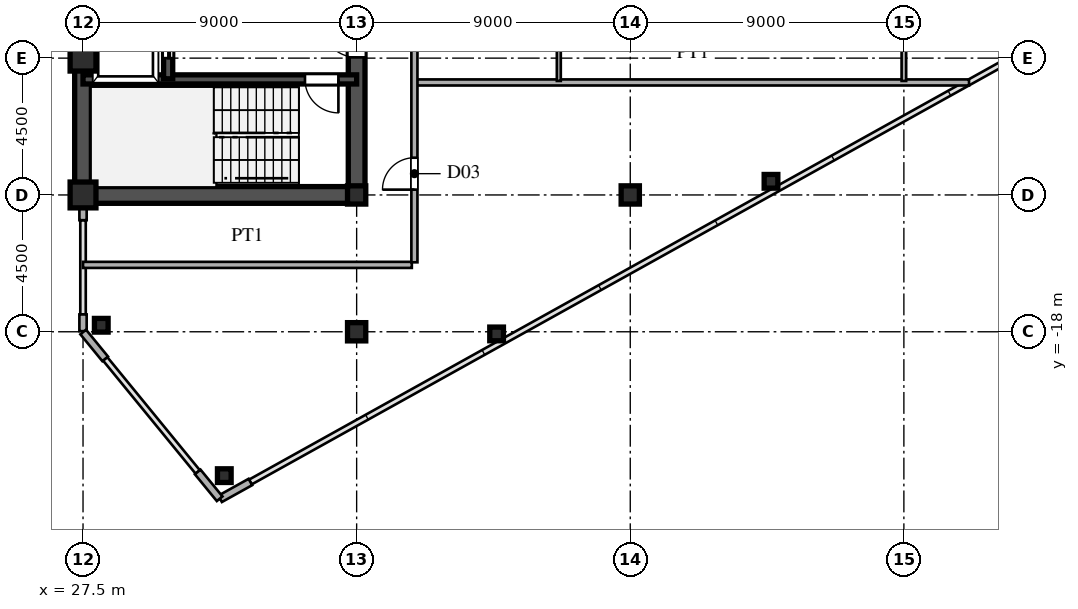
"""IFC4 building model, lengths in metres.
Left out: names, types, materials, properties, quantities, classifications, styles, units other than length and angle.
Written with IfcOpenShell. Run it as: python <this file> out.ifc"""

import sys

from ifc_helpers import new_model, si_unit, direction, frame, frame_2d, origin, origin_2d, place, context, subcontext, project, spatial, rectangle, hollow_rectangle, i_section, extrude, source, transform, mapped, element, fill, save


model = new_model("IFC4")
c1 = context("Model", 3, precision=1e-05, world=origin(), true_north=direction((0.0, 1.0)))
c2 = subcontext(c1, "Body", "Model", "MODEL_VIEW")
j1 = project(units=[si_unit("LENGTHUNIT", "METRE"), si_unit("PLANEANGLEUNIT", "RADIAN")], contexts=[c1])
p1 = place(None, origin())
s1 = spatial("IfcSite", under=j1, at=p1, CompositionType="ELEMENT")
p2 = place(p1, origin())
s2 = spatial("IfcBuilding", under=s1, at=p2, CompositionType="ELEMENT")
p3 = place(p2, frame((0.0, 0.0, 188.7)))
s3 = spatial("IfcBuildingStorey", under=s2, at=p3, CompositionType="ELEMENT", Elevation=188.7)
m1 = source(origin(), c2, "Body", "SweptSolid", [
    extrude(hollow_rectangle(XDim=0.85, YDim=0.85, WallThickness=0.036, at=origin_2d()), origin(), (0.0, 0.0, 1.0), 3.6),
])
for number, where, z_axis, x_axis in (
    (1, (27.5, -13.5, 0.0), (0.0, 0.0, 1.0), (1.0, 0.0, 0.0)),
    (2, (27.5, -9.0, 0.0), (0.0, 0.0, 1.0), (1.0, 0.0, 0.0)),
):
    element("IfcColumn", number, at=place(p3, frame(where, z_axis=z_axis, x_axis=x_axis)), inside=s3, PredefinedType="COLUMN", context=c2, shape_type="MappedRepresentation", body=[
        mapped(m1, transform((0.0, 0.0, 0.0), scale=1.0)),
    ])
m2 = source(origin(), c2, "Body", "SweptSolid", [
    extrude(i_section(OverallWidth=0.6, OverallDepth=0.6, WebThickness=0.025, FlangeThickness=0.04, at=origin_2d()), origin(), (0.0, 0.0, 1.0), 3.6),
])
for number, where, z_axis, x_axis in (
    (3, (36.5, -18.0, 0.0), (0.0, 0.0, 1.0), (1.0, 0.0, 0.0)),
    (4, (36.5, -13.5, 0.0), (0.0, 0.0, 1.0), (1.0, 0.0, 0.0)),
    (5, (45.5, -13.5, 0.0), (0.0, 0.0, 1.0), (1.0, 0.0, 0.0)),
):
    element("IfcColumn", number, at=place(p3, frame(where, z_axis=z_axis, x_axis=x_axis)), inside=s3, PredefinedType="COLUMN", context=c2, shape_type="MappedRepresentation", body=[
        mapped(m2, transform((0.0, 0.0, 0.0), scale=1.0)),
    ])
m3 = source(origin(), c2, "Body", "SweptSolid", [
    extrude(hollow_rectangle(XDim=0.45, YDim=0.45, WallThickness=0.018, at=origin_2d()), origin(), (0.0, 0.0, 1.0), 3.6),
])
for number, where, z_axis, x_axis in (
    (6, (32.147, -22.732, 0.0), (0.0, 0.0, 1.0), (1.0, 0.0, 0.0)),
    (7, (28.1, -17.786, 0.0), (0.0, 0.0, 1.0), (1.0, 0.0, 0.0)),
    (8, (41.104, -18.071, 0.0), (0.0, 0.0, 1.0), (1.0, 0.0, 0.0)),
    (9, (50.129, -13.051, 0.0), (0.0, 0.0, 1.0), (1.0, 0.0, 0.0)),
):
    element("IfcColumn", number, at=place(p3, frame(where, z_axis=z_axis, x_axis=x_axis)), inside=s3, PredefinedType="COLUMN", context=c2, shape_type="MappedRepresentation", body=[
        mapped(m3, transform((0.0, 0.0, 0.0), scale=1.0)),
    ])
p4 = place(p3, frame((32.009, -23.495, 0.0), z_axis=(0.0, 0.0, 1.0), x_axis=(0.87385402111, 0.486188389196, 0.0)))
e10 = element("IfcWall", 10, at=p4, inside=s3, PredefinedType="SOLIDWALL", context=c2, shape_type="SweptSolid", body=[
    extrude(rectangle(XDim=1.14, YDim=0.24, at=frame_2d((0.57, 0.0))), origin(), (0.0, 0.0, 1.0), 3.38),
])
p5 = place(p3, frame((27.5, -17.98, 0.0), z_axis=(0.0, 0.0, 1.0), x_axis=(0.0, 1.0, 0.0)))
e11 = element("IfcWall", 11, at=p5, inside=s3, PredefinedType="SOLIDWALL", context=c2, shape_type="SweptSolid", body=[
    extrude(rectangle(XDim=0.55, YDim=0.24, at=frame_2d((0.275, 0.0))), origin(), (0.0, 0.0, 1.0), 3.38),
])
p6 = place(p3, frame((27.5, -14.33, 0.0), z_axis=(0.0, 0.0, 1.0), x_axis=(0.0, 1.0, 0.0)))
e12 = element("IfcWall", 12, at=p6, inside=s3, PredefinedType="SOLIDWALL", context=c2, shape_type="SweptSolid", body=[
    extrude(rectangle(XDim=0.55, YDim=0.24, at=frame_2d((0.275, 0.0))), origin(), (0.0, 0.0, 1.0), 2.88),
])
for number, where, z_axis, x_axis in (
    (13, (27.506, -18.008, 0.0), (0.0, 0.0, 1.0), (0.633, -0.774, 0.0)),
    (14, (31.272, -22.61, 0.0), (0.0, 0.0, 1.0), (0.633, -0.774, 0.0)),
):
    element("IfcWall", number, at=place(p3, frame(where, z_axis=z_axis, x_axis=x_axis)), inside=s3, PredefinedType="SOLIDWALL", context=c2, shape_type="SweptSolid", body=[
        extrude(rectangle(XDim=1.14, YDim=0.24, at=frame_2d((0.57, 0.0))), origin(), (0.0, 0.0, 1.0), 3.38),
    ])
p7 = place(p3, frame((27.5, -13.5, 0.0), z_axis=(0.0, 0.0, 1.0), x_axis=(0.0, 1.0, 0.0)))
e15 = element("IfcWall", 15, at=p7, inside=s3, PredefinedType="SHEAR", context=c2, shape_type="SweptSolid", body=[
    extrude(rectangle(XDim=12.2, YDim=0.55, at=frame_2d((6.1, 0.0))), origin(), (0.0, 0.0, 1.0), 3.38),
])
p8 = place(p3, frame((27.5, -13.5, 0.0), z_axis=(0.0, 0.0, 1.0), x_axis=(1.0, 0.0, 0.0)))
e16 = element("IfcWall", 16, at=p8, inside=s3, PredefinedType="SHEAR", context=c2, shape_type="SweptSolid", body=[
    extrude(rectangle(XDim=9.0, YDim=0.55, at=frame_2d((4.5, 0.0))), origin(), (0.0, 0.0, 1.0), 3.38),
])
p9 = place(p3, frame((36.5, -13.65, 0.0), z_axis=(0.0, 0.0, 1.0), x_axis=(0.0, 1.0, 0.0)))
e17 = element("IfcWall", 17, at=p9, inside=s3, PredefinedType="SHEAR", context=c2, shape_type="SweptSolid", body=[
    extrude(rectangle(XDim=7.15, YDim=0.55, at=frame_2d((3.575, 0.0))), origin(), (0.0, 0.0, 1.0), 3.38),
])
p10 = place(p9, frame((4.675, 0.0, 0.0)))
e18 = element("IfcOpeningElement", 18, at=p10, cuts=e17, PredefinedType="OPENING", context=c2, shape_type="SweptSolid", body=[
    extrude(rectangle(XDim=1.15, YDim=2.2, at=frame_2d((0.575, 1.1))), frame((0.0, 0.285, 0.0), z_axis=(0.0, -1.0, 0.0), x_axis=(1.0, 0.0, 0.0)), (0.0, 0.0, 1.0), 0.57),
])
p11 = place(p3, frame((27.5, -9.7, 0.0), z_axis=(0.0, 0.0, 1.0), x_axis=(1.0, 0.0, 0.0)))
e19 = element("IfcWall", 19, at=p11, inside=s3, PredefinedType="SHEAR", context=c2, shape_type="SweptSolid", body=[
    extrude(rectangle(XDim=9.0, YDim=0.3, at=frame_2d((4.5, 0.0))), origin(), (0.0, 0.0, 1.0), 3.38),
])
p12 = place(p11, frame((7.3, 0.0, 0.0)))
e20 = element("IfcOpeningElement", 20, at=p12, cuts=e19, PredefinedType="OPENING", context=c2, shape_type="SweptSolid", body=[
    extrude(rectangle(XDim=1.1, YDim=2.2, at=frame_2d((0.55, 1.1))), frame((0.0, 0.16, 0.0), z_axis=(0.0, -1.0, 0.0), x_axis=(1.0, 0.0, 0.0)), (0.0, 0.0, 1.0), 0.32),
])
p13 = place(p3, frame((30.3, -9.68, 0.0), z_axis=(0.0, 0.0, 1.0), x_axis=(0.0, 1.0, 0.0)))
e21 = element("IfcWall", 21, at=p13, inside=s3, PredefinedType="SHEAR", context=c2, shape_type="SweptSolid", body=[
    extrude(rectangle(XDim=2.56, YDim=0.3, at=frame_2d((1.28, 0.0))), origin(), (0.0, 0.0, 1.0), 3.38),
])
p14 = place(p13, frame((0.68, 0.0, 0.0)))
e22 = element("IfcOpeningElement", 22, at=p14, cuts=e21, PredefinedType="OPENING", context=c2, shape_type="SweptSolid", body=[
    extrude(rectangle(XDim=1.2, YDim=2.25, at=frame_2d((0.6, 1.125))), frame((0.0, 0.16, 0.0), z_axis=(0.0, -1.0, 0.0), x_axis=(1.0, 0.0, 0.0)), (0.0, 0.0, 1.0), 0.32),
])
p15 = place(p3, frame((27.5, -15.8, 0.0), z_axis=(0.0, 0.0, 1.0), x_axis=(1.0, 0.0, 0.0)))
e23 = element("IfcWall", 23, at=p15, inside=s3, PredefinedType="PARTITIONING", context=c2, shape_type="SweptSolid", body=[
    extrude(rectangle(XDim=10.815, YDim=0.2, at=frame_2d((5.407, 0.0))), origin(), (0.0, 0.0, 1.0), 3.38),
])
p16 = place(p3, frame((38.48, -9.8, 0.0), z_axis=(0.0, 0.0, 1.0), x_axis=(1.0, 0.0, 0.0)))
e24 = element("IfcWall", 24, at=p16, inside=s3, PredefinedType="PARTITIONING", context=c2, shape_type="SweptSolid", body=[
    extrude(rectangle(XDim=18.163, YDim=0.2, at=frame_2d((9.082, 0.0))), origin(), (0.0, 0.0, 1.0), 3.38),
])
p17 = place(p3, frame((38.4, -15.715, 0.0), z_axis=(0.0, 0.0, 1.0), x_axis=(0.0, 1.0, 0.0)))
e25 = element("IfcWall", 25, at=p17, inside=s3, PredefinedType="PARTITIONING", context=c2, shape_type="SweptSolid", body=[
    extrude(rectangle(XDim=31.43, YDim=0.2, at=frame_2d((15.715, 0.0))), origin(), (0.0, 0.0, 1.0), 3.38),
])
p18 = place(p17, frame((2.39, 0.0, 0.0)))
e26 = element("IfcOpeningElement", 26, at=p18, cuts=e25, PredefinedType="OPENING", context=c2, shape_type="SweptSolid", body=[
    extrude(rectangle(XDim=1.05, YDim=2.25, at=frame_2d((0.525, 1.125))), frame((0.0, 0.11, 0.0), z_axis=(0.0, -1.0, 0.0), x_axis=(1.0, 0.0, 0.0)), (0.0, 0.0, 1.0), 0.22),
])
p19 = place(p17, frame((11.695, 0.0, 0.0)))
e27 = element("IfcOpeningElement", 27, at=p19, cuts=e25, PredefinedType="OPENING", context=c2, shape_type="SweptSolid", body=[
    extrude(rectangle(XDim=1.05, YDim=2.25, at=frame_2d((0.525, 1.125))), frame((0.0, 0.11, 0.0), z_axis=(0.0, -1.0, 0.0), x_axis=(1.0, 0.0, 0.0)), (0.0, 0.0, 1.0), 0.22),
])
p20 = place(p17, frame((24.69, 0.0, 0.0)))
e28 = element("IfcOpeningElement", 28, at=p20, cuts=e25, PredefinedType="OPENING", context=c2, shape_type="SweptSolid", body=[
    extrude(rectangle(XDim=1.05, YDim=2.25, at=frame_2d((0.525, 1.125))), frame((0.0, 0.11, 0.0), z_axis=(0.0, -1.0, 0.0), x_axis=(1.0, 0.0, 0.0)), (0.0, 0.0, 1.0), 0.22),
])
p21 = place(p3, frame((43.15, -9.75, 0.0), z_axis=(0.0, 0.0, 1.0), x_axis=(0.0, 1.0, 0.0)))
e29 = element("IfcWall", 29, at=p21, inside=s3, PredefinedType="PARTITIONING", context=c2, shape_type="SweptSolid", body=[
    extrude(rectangle(XDim=3.408, YDim=0.13, at=frame_2d((1.704, 0.0))), origin(), (0.0, 0.0, 1.0), 3.38),
])
p22 = place(p3, frame((54.5, -9.75, 0.0), z_axis=(0.0, 0.0, 1.0), x_axis=(0.0, 1.0, 0.0)))
e30 = element("IfcWall", 30, at=p22, inside=s3, PredefinedType="PARTITIONING", context=c2, shape_type="SweptSolid", body=[
    extrude(rectangle(XDim=12.9, YDim=0.15, at=frame_2d((6.45, 0.0))), origin(), (0.0, 0.0, 1.0), 2.78),
])
p23 = place(p22, frame((5.975, 0.0, 0.0)))
e31 = element("IfcOpeningElement", 31, at=p23, cuts=e30, PredefinedType="OPENING", context=c2, shape_type="SweptSolid", body=[
    extrude(rectangle(XDim=0.95, YDim=2.15, at=frame_2d((0.475, 1.075))), frame((0.0, 0.085, 0.0), z_axis=(0.0, -1.0, 0.0), x_axis=(1.0, 0.0, 0.0)), (0.0, 0.0, 1.0), 0.17),
])
m4 = source(origin(), c2, "Body", "SweptSolid", [
    extrude(rectangle(XDim=1.15, YDim=2.2, at=frame_2d((0.575, 1.1))), frame((0.0, 0.025, 0.0), z_axis=(0.0, -1.0, 0.0), x_axis=(1.0, 0.0, 0.0)), (0.0, 0.0, 1.0), 0.05),
])
p24 = place(p10, origin())
e32 = element("IfcDoor", 32, at=p24, inside=s3, OperationType="SINGLE_SWING_RIGHT", PredefinedType="DOOR", context=c2, shape_type="MappedRepresentation", body=[
    mapped(m4, transform((0.0, 0.0, 0.0), scale=1.0)),
])
fill(e18, e32)
m5 = source(origin(), c2, "Body", "SweptSolid", [
    extrude(rectangle(XDim=1.1, YDim=2.2, at=frame_2d((0.55, 1.1))), frame((0.0, 0.025, 0.0), z_axis=(0.0, -1.0, 0.0), x_axis=(1.0, 0.0, 0.0)), (0.0, 0.0, 1.0), 0.05),
])
p25 = place(p12, frame((1.1, 0.0, 0.0), z_axis=(0.0, 0.0, 1.0), x_axis=(-1.0, 0.0, 0.0)))
e33 = element("IfcDoor", 33, at=p25, inside=s3, OperationType="SINGLE_SWING_RIGHT", PredefinedType="DOOR", context=c2, shape_type="MappedRepresentation", body=[
    mapped(m5, transform((0.0, 0.0, 0.0), scale=1.0)),
])
fill(e20, e33)
m6 = source(origin(), c2, "Body", "SweptSolid", [
    extrude(rectangle(XDim=1.2, YDim=2.25, at=frame_2d((0.6, 1.125))), frame((0.0, 0.025, 0.0), z_axis=(0.0, -1.0, 0.0), x_axis=(1.0, 0.0, 0.0)), (0.0, 0.0, 1.0), 0.05),
])
p26 = place(p14, origin())
e34 = element("IfcDoor", 34, at=p26, inside=s3, OperationType="DOUBLE_DOOR_SLIDING", PredefinedType="DOOR", context=c2, shape_type="MappedRepresentation", body=[
    mapped(m6, transform((0.0, 0.0, 0.0), scale=1.0)),
])
fill(e22, e34)
m7 = source(origin(), c2, "Body", "SweptSolid", [
    extrude(rectangle(XDim=1.05, YDim=2.25, at=frame_2d((0.525, 1.125))), frame((0.0, 0.025, 0.0), z_axis=(0.0, -1.0, 0.0), x_axis=(1.0, 0.0, 0.0)), (0.0, 0.0, 1.0), 0.05),
])
p27 = place(p18, origin())
e35 = element("IfcDoor", 35, at=p27, inside=s3, OperationType="SINGLE_SWING_LEFT", PredefinedType="DOOR", context=c2, shape_type="MappedRepresentation", body=[
    mapped(m7, transform((0.0, 0.0, 0.0), scale=1.0)),
])
fill(e26, e35)
save(model, sys.argv[1])
